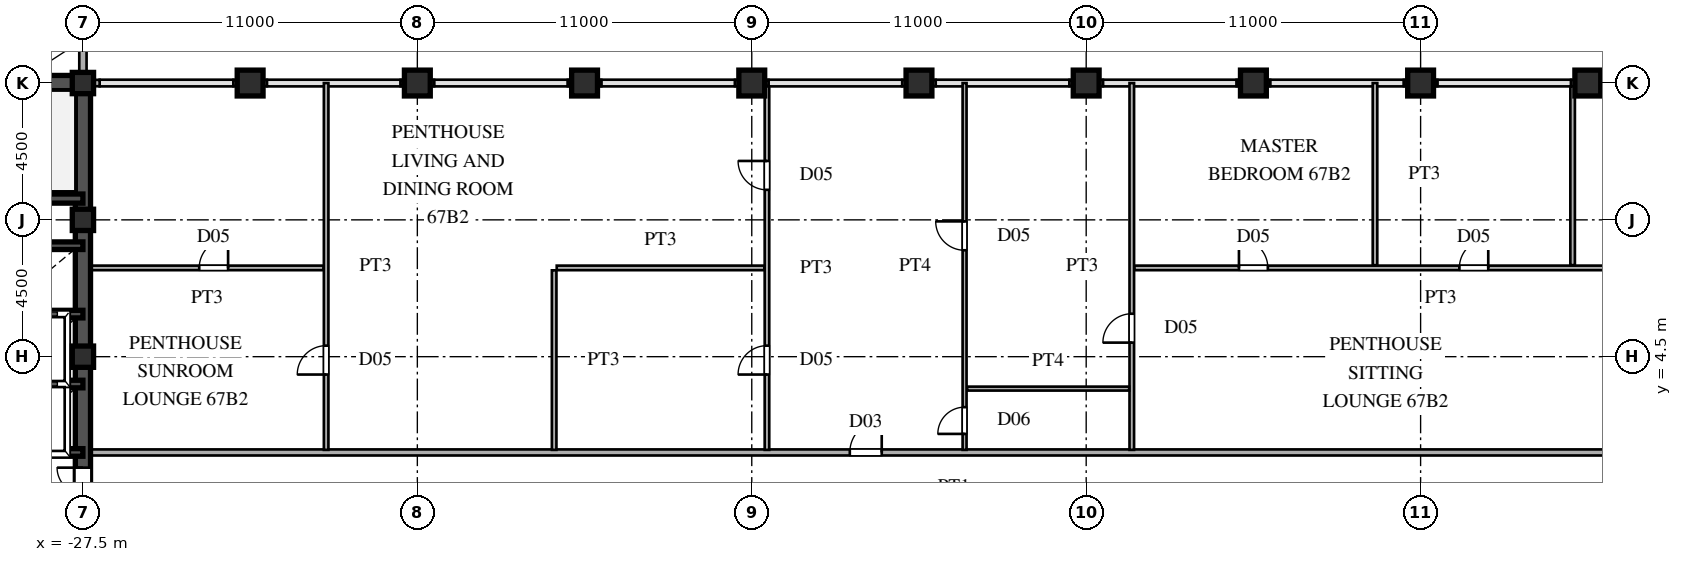
"""IFC4 building model, lengths in metres.
Left out: names, types, materials, properties, quantities, classifications, styles, units other than length and angle.
Written with IfcOpenShell. Run it as: python <this file> out.ifc"""

import sys

from ifc_helpers import new_model, si_unit, direction, frame, frame_2d, origin, origin_2d, place, context, subcontext, project, spatial, rectangle, hollow_rectangle, extrude, source, transform, mapped, element, fill, save


model = new_model("IFC4")
c1 = context("Model", 3, precision=1e-05, world=origin(), true_north=direction((0.0, 1.0)))
c2 = subcontext(c1, "Body", "Model", "MODEL_VIEW")
j1 = project(units=[si_unit("LENGTHUNIT", "METRE"), si_unit("PLANEANGLEUNIT", "RADIAN")], contexts=[c1])
p1 = place(None, origin())
s1 = spatial("IfcSite", under=j1, at=p1, CompositionType="ELEMENT")
p2 = place(p1, origin())
s2 = spatial("IfcBuilding", under=s1, at=p2, CompositionType="ELEMENT")
p3 = place(p2, frame((0.0, 0.0, 254.4)))
s3 = spatial("IfcBuildingStorey", under=s2, at=p3, CompositionType="ELEMENT", Elevation=254.4)
m1 = source(origin(), c2, "Body", "SweptSolid", [
    extrude(hollow_rectangle(XDim=0.7, YDim=0.7, WallThickness=0.03, at=origin_2d()), origin(), (0.0, 0.0, 1.0), 3.75),
])
for number, where, z_axis, x_axis in (
    (1, (-27.5, 4.5, 0.0), (0.0, 0.0, 1.0), (1.0, 0.0, 0.0)),
    (2, (-27.5, 9.0, 0.0), (0.0, 0.0, 1.0), (1.0, 0.0, 0.0)),
    (3, (-27.5, 13.5, 0.0), (0.0, 0.0, 1.0), (1.0, 0.0, 0.0)),
):
    element("IfcColumn", number, at=place(p3, frame(where, z_axis=z_axis, x_axis=x_axis)), inside=s3, PredefinedType="COLUMN", context=c2, shape_type="MappedRepresentation", body=[
        mapped(m1, transform((0.0, 0.0, 0.0), scale=1.0)),
    ])
m2 = source(origin(), c2, "Body", "SweptSolid", [
    extrude(hollow_rectangle(XDim=0.85, YDim=0.85, WallThickness=0.036, at=origin_2d()), origin(), (0.0, 0.0, 1.0), 3.75),
])
for number, where, z_axis, x_axis in (
    (4, (-22.0, 13.5, 0.0), (0.0, 0.0, 1.0), (1.0, 0.0, 0.0)),
    (5, (-16.5, 13.5, 0.0), (0.0, 0.0, 1.0), (1.0, 0.0, 0.0)),
    (6, (-11.0, 13.5, 0.0), (0.0, 0.0, 1.0), (1.0, 0.0, 0.0)),
    (7, (-5.5, 13.5, 0.0), (0.0, 0.0, 1.0), (1.0, 0.0, 0.0)),
    (8, (0.0, 13.5, 0.0), (0.0, 0.0, 1.0), (1.0, 0.0, 0.0)),
    (9, (5.5, 13.5, 0.0), (0.0, 0.0, 1.0), (1.0, 0.0, 0.0)),
    (10, (11.0, 13.5, 0.0), (0.0, 0.0, 1.0), (1.0, 0.0, 0.0)),
    (11, (16.5, 13.5, 0.0), (0.0, 0.0, 1.0), (1.0, 0.0, 0.0)),
    (12, (22.0, 13.5, 0.0), (0.0, 0.0, 1.0), (1.0, 0.0, 0.0)),
):
    element("IfcColumn", number, at=place(p3, frame(where, z_axis=z_axis, x_axis=x_axis)), inside=s3, PredefinedType="COLUMN", context=c2, shape_type="MappedRepresentation", body=[
        mapped(m2, transform((0.0, 0.0, 0.0), scale=1.0)),
    ])
p4 = place(p3, frame((-27.5, 13.755, 0.0), z_axis=(0.0, 0.0, 1.0), x_axis=(0.0, 1.0, 0.0)))
e13 = element("IfcWall", 13, at=p4, inside=s3, PredefinedType="SOLIDWALL", context=c2, shape_type="SweptSolid", body=[
    extrude(rectangle(XDim=0.62, YDim=0.24, at=frame_2d((0.31, 0.0))), origin(), (0.0, 0.0, 1.0), 3.03),
])
p5 = place(p3, frame((-27.5, 14.375, 0.0), z_axis=(0.0, 0.0, 1.0), x_axis=(0.0, 1.0, 0.0)))
e14 = element("IfcWall", 14, at=p5, inside=s3, PredefinedType="SOLIDWALL", context=c2, shape_type="SweptSolid", body=[
    extrude(rectangle(XDim=1.605, YDim=0.24, at=frame_2d((0.803, 0.0))), origin(), (0.0, 0.0, 1.0), 3.53),
])
p6 = place(p3, frame((-27.49, 13.5, 0.0), z_axis=(0.0, 0.0, 1.0), x_axis=(1.0, 0.0, 0.0)))
e15 = element("IfcWall", 15, at=p6, inside=s3, PredefinedType="SOLIDWALL", context=c2, shape_type="SweptSolid", body=[
    extrude(rectangle(XDim=0.54, YDim=0.21, at=frame_2d((0.27, 0.0))), origin(), (0.0, 0.0, 1.0), 3.03),
])
for number, where, z_axis, x_axis in (
    (16, (-22.55, 13.5, 0.0), (0.0, 0.0, 1.0), (1.0, 0.0, 0.0)),
    (17, (-17.05, 13.5, 0.0), (0.0, 0.0, 1.0), (1.0, 0.0, 0.0)),
    (18, (-11.55, 13.5, 0.0), (0.0, 0.0, 1.0), (1.0, 0.0, 0.0)),
    (19, (-6.05, 13.5, 0.0), (0.0, 0.0, 1.0), (1.0, 0.0, 0.0)),
    (20, (-0.55, 13.5, 0.0), (0.0, 0.0, 1.0), (1.0, 0.0, 0.0)),
    (21, (4.95, 13.5, 0.0), (0.0, 0.0, 1.0), (1.0, 0.0, 0.0)),
    (22, (10.45, 13.5, 0.0), (0.0, 0.0, 1.0), (1.0, 0.0, 0.0)),
    (23, (15.95, 13.5, 0.0), (0.0, 0.0, 1.0), (1.0, 0.0, 0.0)),
    (24, (21.45, 13.5, 0.0), (0.0, 0.0, 1.0), (1.0, 0.0, 0.0)),
):
    element("IfcWall", number, at=place(p3, frame(where, z_axis=z_axis, x_axis=x_axis)), inside=s3, PredefinedType="SOLIDWALL", context=c2, shape_type="SweptSolid", body=[
        extrude(rectangle(XDim=1.1, YDim=0.21, at=frame_2d((0.55, 0.0))), origin(), (0.0, 0.0, 1.0), 3.03),
    ])
p7 = place(p3, frame((-27.5, 1.3, 0.0), z_axis=(0.0, 0.0, 1.0), x_axis=(0.0, 1.0, 0.0)))
e25 = element("IfcWall", 25, at=p7, inside=s3, PredefinedType="SHEAR", context=c2, shape_type="SweptSolid", body=[
    extrude(rectangle(XDim=12.2, YDim=0.5, at=frame_2d((6.1, 0.0))), origin(), (0.0, 0.0, 1.0), 3.53),
])
p8 = place(p3, frame((-27.5, -1.3, 0.0), z_axis=(0.0, 0.0, 1.0), x_axis=(0.0, 1.0, 0.0)))
e26 = element("IfcWall", 26, at=p8, inside=s3, PredefinedType="SHEAR", context=c2, shape_type="SweptSolid", body=[
    extrude(rectangle(XDim=2.6, YDim=0.5, at=frame_2d((1.3, 0.0))), origin(), (0.0, 0.0, 1.0), 3.53),
])
p9 = place(p8, frame((0.45, 0.0, 0.0)))
e27 = element("IfcOpeningElement", 27, at=p9, cuts=e26, PredefinedType="OPENING", context=c2, shape_type="SweptSolid", body=[
    extrude(rectangle(XDim=1.7, YDim=2.35, at=frame_2d((0.85, 1.175))), frame((0.0, 0.26, 0.0), z_axis=(0.0, -1.0, 0.0), x_axis=(1.0, 0.0, 0.0)), (0.0, 0.0, 1.0), 0.52),
])
p10 = place(p3, frame((-36.5, 13.5, 0.0), z_axis=(0.0, 0.0, 1.0), x_axis=(1.0, 0.0, 0.0)))
e28 = element("IfcWall", 28, at=p10, inside=s3, PredefinedType="SHEAR", context=c2, shape_type="SweptSolid", body=[
    extrude(rectangle(XDim=9.0, YDim=0.5, at=frame_2d((4.5, 0.0))), origin(), (0.0, 0.0, 1.0), 3.53),
])
p11 = place(p3, frame((-36.5, 9.7, 0.0), z_axis=(0.0, 0.0, 1.0), x_axis=(1.0, 0.0, 0.0)))
e29 = element("IfcWall", 29, at=p11, inside=s3, PredefinedType="SHEAR", context=c2, shape_type="SweptSolid", body=[
    extrude(rectangle(XDim=9.0, YDim=0.3, at=frame_2d((4.5, 0.0))), origin(), (0.0, 0.0, 1.0), 3.53),
])
p12 = place(p11, frame((0.6, 0.0, 0.0)))
e30 = element("IfcOpeningElement", 30, at=p12, cuts=e29, PredefinedType="OPENING", context=c2, shape_type="SweptSolid", body=[
    extrude(rectangle(XDim=1.1, YDim=2.2, at=frame_2d((0.55, 1.1))), frame((0.0, 0.16, 0.0), z_axis=(0.0, -1.0, 0.0), x_axis=(1.0, 0.0, 0.0)), (0.0, 0.0, 1.0), 0.32),
])
for number, where, z_axis, x_axis in (
    (31, (-30.3, 1.35, 0.0), (0.0, 0.0, 1.0), (1.0, 0.0, 0.0)),
    (32, (-30.3, 3.6, 0.0), (0.0, 0.0, 1.0), (1.0, 0.0, 0.0)),
    (33, (-30.3, 5.9, 0.0), (0.0, 0.0, 1.0), (1.0, 0.0, 0.0)),
    (34, (-30.3, 8.15, 0.0), (0.0, 0.0, 1.0), (1.0, 0.0, 0.0)),
):
    element("IfcWall", number, at=place(p3, frame(where, z_axis=z_axis, x_axis=x_axis)), inside=s3, PredefinedType="SHEAR", context=c2, shape_type="SweptSolid", body=[
        extrude(rectangle(XDim=2.8, YDim=0.25, at=frame_2d((1.4, 0.0))), origin(), (0.0, 0.0, 1.0), 3.53),
    ])
p13 = place(p3, frame((-27.245, 1.35, 0.0), z_axis=(0.0, 0.0, 1.0), x_axis=(1.0, 0.0, 0.0)))
e35 = element("IfcWall", 35, at=p13, inside=s3, PredefinedType="PARTITIONING", context=c2, shape_type="SweptSolid", body=[
    extrude(rectangle(XDim=54.49, YDim=0.2, at=frame_2d((27.245, 0.0))), origin(), (0.0, 0.0, 1.0), 3.53),
])
p14 = place(p13, frame((24.97, 0.0, 0.0)))
e36 = element("IfcOpeningElement", 36, at=p14, cuts=e35, PredefinedType="OPENING", context=c2, shape_type="SweptSolid", body=[
    extrude(rectangle(XDim=1.05, YDim=2.25, at=frame_2d((0.525, 1.125))), frame((0.0, 0.11, 0.0), z_axis=(0.0, -1.0, 0.0), x_axis=(1.0, 0.0, 0.0)), (0.0, 0.0, 1.0), 0.22),
])
p15 = place(p3, frame((1.585, 3.45, 0.0), z_axis=(0.0, 0.0, 1.0), x_axis=(1.0, 0.0, 0.0)))
e37 = element("IfcWall", 37, at=p15, inside=s3, PredefinedType="PARTITIONING", context=c2, shape_type="SweptSolid", body=[
    extrude(rectangle(XDim=5.33, YDim=0.13, at=frame_2d((2.665, 0.0))), origin(), (0.0, 0.0, 1.0), 3.53),
])
p16 = place(p3, frame((-27.245, 7.42, 0.0), z_axis=(0.0, 0.0, 1.0), x_axis=(1.0, 0.0, 0.0)))
e38 = element("IfcWall", 38, at=p16, inside=s3, PredefinedType="PARTITIONING", context=c2, shape_type="SweptSolid", body=[
    extrude(rectangle(XDim=7.66, YDim=0.15, at=frame_2d((3.83, 0.0))), origin(), (0.0, 0.0, 1.0), 3.53),
])
p17 = place(p16, frame((3.57, 0.0, 0.0)))
e39 = element("IfcOpeningElement", 39, at=p17, cuts=e38, PredefinedType="OPENING", context=c2, shape_type="SweptSolid", body=[
    extrude(rectangle(XDim=0.95, YDim=2.15, at=frame_2d((0.475, 1.075))), frame((0.0, 0.085, 0.0), z_axis=(0.0, -1.0, 0.0), x_axis=(1.0, 0.0, 0.0)), (0.0, 0.0, 1.0), 0.17),
])
p18 = place(p3, frame((-11.915, 7.42, 0.0), z_axis=(0.0, 0.0, 1.0), x_axis=(1.0, 0.0, 0.0)))
e40 = element("IfcWall", 40, at=p18, inside=s3, PredefinedType="PARTITIONING", context=c2, shape_type="SweptSolid", body=[
    extrude(rectangle(XDim=6.83, YDim=0.15, at=frame_2d((3.415, 0.0))), origin(), (0.0, 0.0, 1.0), 3.53),
])
p19 = place(p3, frame((7.085, 7.42, 0.0), z_axis=(0.0, 0.0, 1.0), x_axis=(1.0, 0.0, 0.0)))
e41 = element("IfcWall", 41, at=p19, inside=s3, PredefinedType="PARTITIONING", context=c2, shape_type="SweptSolid", body=[
    extrude(rectangle(XDim=20.16, YDim=0.15, at=frame_2d((10.08, 0.0))), origin(), (0.0, 0.0, 1.0), 3.53),
])
p20 = place(p19, frame((3.44, 0.0, 0.0)))
e42 = element("IfcOpeningElement", 42, at=p20, cuts=e41, PredefinedType="OPENING", context=c2, shape_type="SweptSolid", body=[
    extrude(rectangle(XDim=0.95, YDim=2.15, at=frame_2d((0.475, 1.075))), frame((0.0, 0.085, 0.0), z_axis=(0.0, -1.0, 0.0), x_axis=(1.0, 0.0, 0.0)), (0.0, 0.0, 1.0), 0.17),
])
p21 = place(p19, frame((10.69, 0.0, 0.0)))
e43 = element("IfcOpeningElement", 43, at=p21, cuts=e41, PredefinedType="OPENING", context=c2, shape_type="SweptSolid", body=[
    extrude(rectangle(XDim=0.95, YDim=2.15, at=frame_2d((0.475, 1.075))), frame((0.0, 0.085, 0.0), z_axis=(0.0, -1.0, 0.0), x_axis=(1.0, 0.0, 0.0)), (0.0, 0.0, 1.0), 0.17),
])
p22 = place(p19, frame((16.94, 0.0, 0.0)))
e44 = element("IfcOpeningElement", 44, at=p22, cuts=e41, PredefinedType="OPENING", context=c2, shape_type="SweptSolid", body=[
    extrude(rectangle(XDim=0.95, YDim=2.15, at=frame_2d((0.475, 1.075))), frame((0.0, 0.085, 0.0), z_axis=(0.0, -1.0, 0.0), x_axis=(1.0, 0.0, 0.0)), (0.0, 0.0, 1.0), 0.17),
])
p23 = place(p3, frame((-19.5, 1.435, 0.0), z_axis=(0.0, 0.0, 1.0), x_axis=(0.0, 1.0, 0.0)))
e45 = element("IfcWall", 45, at=p23, inside=s3, PredefinedType="PARTITIONING", context=c2, shape_type="SweptSolid", body=[
    extrude(rectangle(XDim=12.065, YDim=0.15, at=frame_2d((6.032, 0.0))), origin(), (0.0, 0.0, 1.0), 3.53),
])
p24 = place(p23, frame((2.478, 0.0, 0.0)))
e46 = element("IfcOpeningElement", 46, at=p24, cuts=e45, PredefinedType="OPENING", context=c2, shape_type="SweptSolid", body=[
    extrude(rectangle(XDim=0.95, YDim=2.15, at=frame_2d((0.475, 1.075))), frame((0.0, 0.085, 0.0), z_axis=(0.0, -1.0, 0.0), x_axis=(1.0, 0.0, 0.0)), (0.0, 0.0, 1.0), 0.17),
])
p25 = place(p3, frame((-12.0, 1.435, 0.0), z_axis=(0.0, 0.0, 1.0), x_axis=(0.0, 1.0, 0.0)))
e47 = element("IfcWall", 47, at=p25, inside=s3, PredefinedType="PARTITIONING", context=c2, shape_type="SweptSolid", body=[
    extrude(rectangle(XDim=5.905, YDim=0.15, at=frame_2d((2.953, 0.0))), origin(), (0.0, 0.0, 1.0), 3.53),
])
p26 = place(p3, frame((-5.0, 1.435, 0.0), z_axis=(0.0, 0.0, 1.0), x_axis=(0.0, 1.0, 0.0)))
e48 = element("IfcWall", 48, at=p26, inside=s3, PredefinedType="PARTITIONING", context=c2, shape_type="SweptSolid", body=[
    extrude(rectangle(XDim=11.955, YDim=0.15, at=frame_2d((5.978, 0.0))), origin(), (0.0, 0.0, 1.0), 3.53),
])
p27 = place(p26, frame((2.478, 0.0, 0.0)))
e49 = element("IfcOpeningElement", 49, at=p27, cuts=e48, PredefinedType="OPENING", context=c2, shape_type="SweptSolid", body=[
    extrude(rectangle(XDim=0.95, YDim=2.15, at=frame_2d((0.475, 1.075))), frame((0.0, 0.085, 0.0), z_axis=(0.0, -1.0, 0.0), x_axis=(1.0, 0.0, 0.0)), (0.0, 0.0, 1.0), 0.17),
])
p28 = place(p26, frame((8.552, 0.0, 0.0)))
e50 = element("IfcOpeningElement", 50, at=p28, cuts=e48, PredefinedType="OPENING", context=c2, shape_type="SweptSolid", body=[
    extrude(rectangle(XDim=0.95, YDim=2.15, at=frame_2d((0.475, 1.075))), frame((0.0, 0.085, 0.0), z_axis=(0.0, -1.0, 0.0), x_axis=(1.0, 0.0, 0.0)), (0.0, 0.0, 1.0), 0.17),
])
p29 = place(p3, frame((1.5, 1.435, 0.0), z_axis=(0.0, 0.0, 1.0), x_axis=(0.0, 1.0, 0.0)))
e51 = element("IfcWall", 51, at=p29, inside=s3, PredefinedType="PARTITIONING", context=c2, shape_type="SweptSolid", body=[
    extrude(rectangle(XDim=12.065, YDim=0.13, at=frame_2d((6.032, 0.0))), origin(), (0.0, 0.0, 1.0), 3.53),
])
p30 = place(p29, frame((0.525, 0.0, 0.0)))
e52 = element("IfcOpeningElement", 52, at=p30, cuts=e51, PredefinedType="OPENING", context=c2, shape_type="SweptSolid", body=[
    extrude(rectangle(XDim=0.88, YDim=2.1, at=frame_2d((0.44, 1.05))), frame((0.0, 0.075, 0.0), z_axis=(0.0, -1.0, 0.0), x_axis=(1.0, 0.0, 0.0)), (0.0, 0.0, 1.0), 0.15),
])
p31 = place(p29, frame((6.565, 0.0, 0.0)))
e53 = element("IfcOpeningElement", 53, at=p31, cuts=e51, PredefinedType="OPENING", context=c2, shape_type="SweptSolid", body=[
    extrude(rectangle(XDim=0.95, YDim=2.15, at=frame_2d((0.475, 1.075))), frame((0.0, 0.075, 0.0), z_axis=(0.0, -1.0, 0.0), x_axis=(1.0, 0.0, 0.0)), (0.0, 0.0, 1.0), 0.15),
])
p32 = place(p3, frame((7.0, 1.435, 0.0), z_axis=(0.0, 0.0, 1.0), x_axis=(0.0, 1.0, 0.0)))
e54 = element("IfcWall", 54, at=p32, inside=s3, PredefinedType="PARTITIONING", context=c2, shape_type="SweptSolid", body=[
    extrude(rectangle(XDim=12.065, YDim=0.15, at=frame_2d((6.032, 0.0))), origin(), (0.0, 0.0, 1.0), 3.53),
])
p33 = place(p32, frame((3.528, 0.0, 0.0)))
e55 = element("IfcOpeningElement", 55, at=p33, cuts=e54, PredefinedType="OPENING", context=c2, shape_type="SweptSolid", body=[
    extrude(rectangle(XDim=0.95, YDim=2.15, at=frame_2d((0.475, 1.075))), frame((0.0, 0.085, 0.0), z_axis=(0.0, -1.0, 0.0), x_axis=(1.0, 0.0, 0.0)), (0.0, 0.0, 1.0), 0.17),
])
p34 = place(p3, frame((15.0, 7.51, 0.0), z_axis=(0.0, 0.0, 1.0), x_axis=(0.0, 1.0, 0.0)))
e56 = element("IfcWall", 56, at=p34, inside=s3, PredefinedType="PARTITIONING", context=c2, shape_type="SweptSolid", body=[
    extrude(rectangle(XDim=5.99, YDim=0.15, at=frame_2d((2.995, 0.0))), origin(), (0.0, 0.0, 1.0), 3.53),
])
p35 = place(p3, frame((21.5, 7.51, 0.0), z_axis=(0.0, 0.0, 1.0), x_axis=(0.0, 1.0, 0.0)))
e57 = element("IfcWall", 57, at=p35, inside=s3, PredefinedType="PARTITIONING", context=c2, shape_type="SweptSolid", body=[
    extrude(rectangle(XDim=5.88, YDim=0.15, at=frame_2d((2.94, 0.0))), origin(), (0.0, 0.0, 1.0), 3.53),
])
m3 = source(origin(), c2, "Body", "SweptSolid", [
    extrude(rectangle(XDim=1.7, YDim=2.35, at=frame_2d((0.85, 1.175))), frame((0.0, 0.025, 0.0), z_axis=(0.0, -1.0, 0.0), x_axis=(1.0, 0.0, 0.0)), (0.0, 0.0, 1.0), 0.05),
])
p36 = place(p9, origin())
e58 = element("IfcDoor", 58, at=p36, inside=s3, OperationType="DOUBLE_SWING_LEFT", PredefinedType="DOOR", context=c2, shape_type="MappedRepresentation", body=[
    mapped(m3, transform((0.0, 0.0, 0.0), scale=1.0)),
])
fill(e27, e58)
m4 = source(origin(), c2, "Body", "SweptSolid", [
    extrude(rectangle(XDim=1.05, YDim=2.25, at=frame_2d((0.525, 1.125))), frame((0.0, 0.025, 0.0), z_axis=(0.0, -1.0, 0.0), x_axis=(1.0, 0.0, 0.0)), (0.0, 0.0, 1.0), 0.05),
])
p37 = place(p14, origin())
e59 = element("IfcDoor", 59, at=p37, inside=s3, OperationType="SINGLE_SWING_RIGHT", PredefinedType="DOOR", context=c2, shape_type="MappedRepresentation", body=[
    mapped(m4, transform((0.0, 0.0, 0.0), scale=1.0)),
])
fill(e36, e59)
m5 = source(origin(), c2, "Body", "SweptSolid", [
    extrude(rectangle(XDim=0.95, YDim=2.15, at=frame_2d((0.475, 1.075))), frame((0.0, 0.025, 0.0), z_axis=(0.0, -1.0, 0.0), x_axis=(1.0, 0.0, 0.0)), (0.0, 0.0, 1.0), 0.05),
])
p38 = place(p17, origin())
e60 = element("IfcDoor", 60, at=p38, inside=s3, OperationType="SINGLE_SWING_RIGHT", PredefinedType="DOOR", context=c2, shape_type="MappedRepresentation", body=[
    mapped(m5, transform((0.0, 0.0, 0.0), scale=1.0)),
])
fill(e39, e60)
p39 = place(p20, origin())
e61 = element("IfcDoor", 61, at=p39, inside=s3, OperationType="SINGLE_SWING_LEFT", PredefinedType="DOOR", context=c2, shape_type="MappedRepresentation", body=[
    mapped(m5, transform((0.0, 0.0, 0.0), scale=1.0)),
])
fill(e42, e61)
p40 = place(p21, origin())
e62 = element("IfcDoor", 62, at=p40, inside=s3, OperationType="SINGLE_SWING_RIGHT", PredefinedType="DOOR", context=c2, shape_type="MappedRepresentation", body=[
    mapped(m5, transform((0.0, 0.0, 0.0), scale=1.0)),
])
fill(e43, e62)
p41 = place(p24, origin())
e63 = element("IfcDoor", 63, at=p41, inside=s3, OperationType="SINGLE_SWING_LEFT", PredefinedType="DOOR", context=c2, shape_type="MappedRepresentation", body=[
    mapped(m5, transform((0.0, 0.0, 0.0), scale=1.0)),
])
fill(e46, e63)
p42 = place(p27, origin())
e64 = element("IfcDoor", 64, at=p42, inside=s3, OperationType="SINGLE_SWING_LEFT", PredefinedType="DOOR", context=c2, shape_type="MappedRepresentation", body=[
    mapped(m5, transform((0.0, 0.0, 0.0), scale=1.0)),
])
fill(e49, e64)
p43 = place(p28, origin())
e65 = element("IfcDoor", 65, at=p43, inside=s3, OperationType="SINGLE_SWING_RIGHT", PredefinedType="DOOR", context=c2, shape_type="MappedRepresentation", body=[
    mapped(m5, transform((0.0, 0.0, 0.0), scale=1.0)),
])
fill(e50, e65)
m6 = source(origin(), c2, "Body", "SweptSolid", [
    extrude(rectangle(XDim=0.88, YDim=2.1, at=frame_2d((0.44, 1.05))), frame((0.0, 0.025, 0.0), z_axis=(0.0, -1.0, 0.0), x_axis=(1.0, 0.0, 0.0)), (0.0, 0.0, 1.0), 0.05),
])
p44 = place(p30, origin())
e66 = element("IfcDoor", 66, at=p44, inside=s3, OperationType="SINGLE_SWING_LEFT", PredefinedType="DOOR", context=c2, shape_type="MappedRepresentation", body=[
    mapped(m6, transform((0.0, 0.0, 0.0), scale=1.0)),
])
fill(e52, e66)
p45 = place(p31, origin())
e67 = element("IfcDoor", 67, at=p45, inside=s3, OperationType="SINGLE_SWING_RIGHT", PredefinedType="DOOR", context=c2, shape_type="MappedRepresentation", body=[
    mapped(m5, transform((0.0, 0.0, 0.0), scale=1.0)),
])
fill(e53, e67)
p46 = place(p33, origin())
e68 = element("IfcDoor", 68, at=p46, inside=s3, OperationType="SINGLE_SWING_LEFT", PredefinedType="DOOR", context=c2, shape_type="MappedRepresentation", body=[
    mapped(m5, transform((0.0, 0.0, 0.0), scale=1.0)),
])
fill(e55, e68)
save(model, sys.argv[1])
